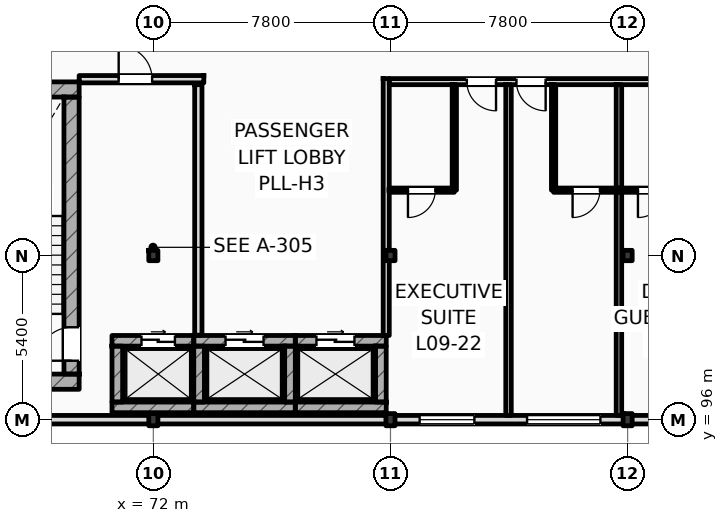
"""IFC4 building model, lengths in metres.
Left out: names, types, materials, properties, quantities, classifications, styles, units other than length and angle.
Written with IfcOpenShell. Run it as: python <this file> out.ifc"""

import sys

from ifc_helpers import new_model, si_unit, direction, frame, frame_2d, origin, origin_2d, place, context, subcontext, project, spatial, rectangle, i_section, extrude, element, fill, save


model = new_model("IFC4")
c1 = context("Model", 3, precision=1e-05, world=origin(), true_north=direction((0.0, 1.0)))
c2 = subcontext(c1, "Body", "Model", "MODEL_VIEW")
j1 = project(units=[si_unit("LENGTHUNIT", "METRE"), si_unit("PLANEANGLEUNIT", "RADIAN")], contexts=[c1])
p1 = place(None, origin())
s1 = spatial("IfcSite", under=j1, at=p1, CompositionType="ELEMENT")
p2 = place(p1, origin())
s2 = spatial("IfcBuilding", under=s1, at=p2, CompositionType="ELEMENT")
p3 = place(p2, frame((0.0, 0.0, 39.0)))
s3 = spatial("IfcBuildingStorey", under=s2, at=p3, CompositionType="ELEMENT", Elevation=39.0)
p4 = place(p3, frame((72.0, 96.0, 0.0), z_axis=(0.0, 0.0, 1.0), x_axis=(1.0, 0.0, 0.0)))
e1 = element("IfcColumn", 1, at=p4, inside=s3, PredefinedType="COLUMN", context=c2, shape_type="SweptSolid", body=[
    extrude(i_section(OverallWidth=0.3, OverallDepth=0.4, WebThickness=0.013, FlangeThickness=0.024, FilletRadius=0.027, at=origin_2d()), origin(), (0.0, 0.0, 1.0), 3.6),
])
p5 = place(p3, frame((72.0, 101.4, 0.0), z_axis=(0.0, 0.0, 1.0), x_axis=(1.0, 0.0, 0.0)))
e2 = element("IfcColumn", 2, at=p5, inside=s3, PredefinedType="COLUMN", context=c2, shape_type="SweptSolid", body=[
    extrude(i_section(OverallWidth=0.3, OverallDepth=0.34, WebThickness=0.012, FlangeThickness=0.021, FilletRadius=0.027, at=origin_2d()), origin(), (0.0, 0.0, 1.0), 3.6),
])
p6 = place(p3, frame((79.8, 96.0, 0.0), z_axis=(0.0, 0.0, 1.0), x_axis=(1.0, 0.0, 0.0)))
e3 = element("IfcColumn", 3, at=p6, inside=s3, PredefinedType="COLUMN", context=c2, shape_type="SweptSolid", body=[
    extrude(i_section(OverallWidth=0.3, OverallDepth=0.4, WebThickness=0.013, FlangeThickness=0.024, FilletRadius=0.027, at=origin_2d()), origin(), (0.0, 0.0, 1.0), 3.6),
])
p7 = place(p3, frame((79.8, 101.4, 0.0), z_axis=(0.0, 0.0, 1.0), x_axis=(1.0, 0.0, 0.0)))
e4 = element("IfcColumn", 4, at=p7, inside=s3, PredefinedType="COLUMN", context=c2, shape_type="SweptSolid", body=[
    extrude(i_section(OverallWidth=0.3, OverallDepth=0.34, WebThickness=0.012, FlangeThickness=0.021, FilletRadius=0.027, at=origin_2d()), origin(), (0.0, 0.0, 1.0), 3.6),
])
p8 = place(p3, frame((87.6, 96.0, 0.0), z_axis=(0.0, 0.0, 1.0), x_axis=(1.0, 0.0, 0.0)))
e5 = element("IfcColumn", 5, at=p8, inside=s3, PredefinedType="COLUMN", context=c2, shape_type="SweptSolid", body=[
    extrude(i_section(OverallWidth=0.3, OverallDepth=0.4, WebThickness=0.013, FlangeThickness=0.024, FilletRadius=0.027, at=origin_2d()), origin(), (0.0, 0.0, 1.0), 3.6),
])
p9 = place(p3, frame((87.6, 101.4, 0.0), z_axis=(0.0, 0.0, 1.0), x_axis=(1.0, 0.0, 0.0)))
e6 = element("IfcColumn", 6, at=p9, inside=s3, PredefinedType="COLUMN", context=c2, shape_type="SweptSolid", body=[
    extrude(i_section(OverallWidth=0.3, OverallDepth=0.34, WebThickness=0.012, FlangeThickness=0.021, FilletRadius=0.027, at=origin_2d()), origin(), (0.0, 0.0, 1.0), 3.6),
])
for number, where, z_axis, x_axis in (
    (7, (64.4, 106.862, 0.0), (0.0, 0.0, 1.0), (1.0, 0.0, 0.0)),
    (8, (64.4, 97.25, 0.0), (0.0, 0.0, 1.0), (1.0, 0.0, 0.0)),
):
    element("IfcWall", number, at=place(p3, frame(where, z_axis=z_axis, x_axis=x_axis)), inside=s3, PredefinedType="SHEAR", context=c2, shape_type="SweptSolid", body=[
        extrude(rectangle(XDim=5.16, YDim=0.5, at=frame_2d((2.58, 0.0))), origin(), (0.0, 0.0, 1.0), 3.6),
    ])
p10 = place(p3, frame((69.31, 97.5, 0.0), z_axis=(0.0, 0.0, 1.0), x_axis=(0.0, 1.0, 0.0)))
e9 = element("IfcWall", 9, at=p10, inside=s3, PredefinedType="SHEAR", context=c2, shape_type="SweptSolid", body=[
    extrude(rectangle(XDim=9.112, YDim=0.5, at=frame_2d((4.556, 0.0))), origin(), (0.0, 0.0, 1.0), 3.6),
])
p11 = place(p10, frame((0.44, 0.0, 0.0)))
e10 = element("IfcOpeningElement", 10, at=p11, cuts=e9, PredefinedType="OPENING", context=c2, shape_type="SweptSolid", body=[
    extrude(rectangle(XDim=1.1, YDim=2.2, at=frame_2d((0.55, 1.1))), frame((0.0, 0.26, 0.0), z_axis=(0.0, -1.0, 0.0), x_axis=(1.0, 0.0, 0.0)), (0.0, 0.0, 1.0), 0.52),
])
p12 = place(p3, frame((25.2, 96.0, 0.0), z_axis=(0.0, 0.0, 1.0), x_axis=(1.0, 0.0, 0.0)))
e11 = element("IfcWall", 11, at=p12, inside=s3, PredefinedType="STANDARD", context=c2, shape_type="SweptSolid", body=[
    extrude(rectangle(XDim=70.2, YDim=0.28, at=frame_2d((35.1, 0.0))), origin(), (0.0, 0.0, 1.0), 2.92),
])
p13 = place(p12, frame((16.695, 0.0, 0.9)))
e12 = element("IfcOpeningElement", 12, at=p13, cuts=e11, PredefinedType="OPENING", context=c2, shape_type="SweptSolid", body=[
    extrude(rectangle(XDim=2.25, YDim=1.84, at=frame_2d((1.125, 0.92))), frame((0.0, 0.15, 0.0), z_axis=(0.0, -1.0, 0.0), x_axis=(1.0, 0.0, 0.0)), (0.0, 0.0, 1.0), 0.3),
])
p14 = place(p12, frame((20.748, 0.0, 0.9)))
e13 = element("IfcOpeningElement", 13, at=p14, cuts=e11, PredefinedType="OPENING", context=c2, shape_type="SweptSolid", body=[
    extrude(rectangle(XDim=1.8, YDim=1.84, at=frame_2d((0.9, 0.92))), frame((0.0, 0.15, 0.0), z_axis=(0.0, -1.0, 0.0), x_axis=(1.0, 0.0, 0.0)), (0.0, 0.0, 1.0), 0.3),
])
p15 = place(p12, frame((25.963, 0.0, 0.9)))
e14 = element("IfcOpeningElement", 14, at=p15, cuts=e11, PredefinedType="OPENING", context=c2, shape_type="SweptSolid", body=[
    extrude(rectangle(XDim=2.55, YDim=1.84, at=frame_2d((1.275, 0.92))), frame((0.0, 0.15, 0.0), z_axis=(0.0, -1.0, 0.0), x_axis=(1.0, 0.0, 0.0)), (0.0, 0.0, 1.0), 0.3),
])
p16 = place(p12, frame((32.177, 0.0, 0.9)))
e15 = element("IfcOpeningElement", 15, at=p16, cuts=e11, PredefinedType="OPENING", context=c2, shape_type="SweptSolid", body=[
    extrude(rectangle(XDim=1.35, YDim=1.84, at=frame_2d((0.675, 0.92))), frame((0.0, 0.15, 0.0), z_axis=(0.0, -1.0, 0.0), x_axis=(1.0, 0.0, 0.0)), (0.0, 0.0, 1.0), 0.3),
])
p17 = place(p12, frame((35.267, 0.0, 0.9)))
e16 = element("IfcOpeningElement", 16, at=p17, cuts=e11, PredefinedType="OPENING", context=c2, shape_type="SweptSolid", body=[
    extrude(rectangle(XDim=2.85, YDim=1.84, at=frame_2d((1.425, 0.92))), frame((0.0, 0.15, 0.0), z_axis=(0.0, -1.0, 0.0), x_axis=(1.0, 0.0, 0.0)), (0.0, 0.0, 1.0), 0.3),
])
p18 = place(p12, frame((55.56, 0.0, 0.9)))
e17 = element("IfcOpeningElement", 17, at=p18, cuts=e11, PredefinedType="OPENING", context=c2, shape_type="SweptSolid", body=[
    extrude(rectangle(XDim=1.8, YDim=1.84, at=frame_2d((0.9, 0.92))), frame((0.0, 0.15, 0.0), z_axis=(0.0, -1.0, 0.0), x_axis=(1.0, 0.0, 0.0)), (0.0, 0.0, 1.0), 0.3),
])
p19 = place(p12, frame((59.093, 0.0, 0.9)))
e18 = element("IfcOpeningElement", 18, at=p19, cuts=e11, PredefinedType="OPENING", context=c2, shape_type="SweptSolid", body=[
    extrude(rectangle(XDim=2.412, YDim=1.84, at=frame_2d((1.206, 0.92))), frame((0.0, 0.15, 0.0), z_axis=(0.0, -1.0, 0.0), x_axis=(1.0, 0.0, 0.0)), (0.0, 0.0, 1.0), 0.3),
])
p20 = place(p12, frame((63.325, 0.0, 0.9)))
e19 = element("IfcOpeningElement", 19, at=p20, cuts=e11, PredefinedType="OPENING", context=c2, shape_type="SweptSolid", body=[
    extrude(rectangle(XDim=1.8, YDim=1.84, at=frame_2d((0.9, 0.92))), frame((0.0, 0.15, 0.0), z_axis=(0.0, -1.0, 0.0), x_axis=(1.0, 0.0, 0.0)), (0.0, 0.0, 1.0), 0.3),
])
p21 = place(p12, frame((66.718, 0.0, 0.9)))
e20 = element("IfcOpeningElement", 20, at=p21, cuts=e11, PredefinedType="OPENING", context=c2, shape_type="SweptSolid", body=[
    extrude(rectangle(XDim=2.472, YDim=1.84, at=frame_2d((1.236, 0.92))), frame((0.0, 0.15, 0.0), z_axis=(0.0, -1.0, 0.0), x_axis=(1.0, 0.0, 0.0)), (0.0, 0.0, 1.0), 0.3),
])
p22 = place(p3, frame((70.64, 98.595, 0.0), z_axis=(0.0, 0.0, 1.0), x_axis=(1.0, 0.0, 0.0)))
e21 = element("IfcWall", 21, at=p22, inside=s3, PredefinedType="SHEAR", context=c2, shape_type="SweptSolid", body=[
    extrude(rectangle(XDim=2.69, YDim=0.35, at=frame_2d((1.345, 0.0))), origin(), (0.0, 0.0, 1.0), 3.38),
])
p23 = place(p22, frame((0.97, 0.0, 0.0)))
e22 = element("IfcOpeningElement", 22, at=p23, cuts=e21, PredefinedType="OPENING", context=c2, shape_type="SweptSolid", body=[
    extrude(rectangle(XDim=1.1, YDim=2.2, at=frame_2d((0.55, 1.1))), frame((0.0, 0.185, 0.0), z_axis=(0.0, -1.0, 0.0), x_axis=(1.0, 0.0, 0.0)), (0.0, 0.0, 1.0), 0.37),
])
p24 = place(p3, frame((70.64, 96.405, 0.0), z_axis=(0.0, 0.0, 1.0), x_axis=(1.0, 0.0, 0.0)))
e23 = element("IfcWall", 23, at=p24, inside=s3, PredefinedType="SHEAR", context=c2, shape_type="SweptSolid", body=[
    extrude(rectangle(XDim=2.69, YDim=0.35, at=frame_2d((1.345, 0.0))), origin(), (0.0, 0.0, 1.0), 3.38),
])
p25 = place(p3, frame((70.815, 96.58, 0.0), z_axis=(0.0, 0.0, 1.0), x_axis=(0.0, 1.0, 0.0)))
e24 = element("IfcWall", 24, at=p25, inside=s3, PredefinedType="SHEAR", context=c2, shape_type="SweptSolid", body=[
    extrude(rectangle(XDim=1.84, YDim=0.35, at=frame_2d((0.92, 0.0))), origin(), (0.0, 0.0, 1.0), 3.38),
])
p26 = place(p3, frame((73.33, 98.595, 0.0), z_axis=(0.0, 0.0, 1.0), x_axis=(1.0, 0.0, 0.0)))
e25 = element("IfcWall", 25, at=p26, inside=s3, PredefinedType="SHEAR", context=c2, shape_type="SweptSolid", body=[
    extrude(rectangle(XDim=3.34, YDim=0.35, at=frame_2d((1.67, 0.0))), origin(), (0.0, 0.0, 1.0), 3.38),
])
p27 = place(p26, frame((1.045, 0.0, 0.0)))
e26 = element("IfcOpeningElement", 26, at=p27, cuts=e25, PredefinedType="OPENING", context=c2, shape_type="SweptSolid", body=[
    extrude(rectangle(XDim=1.25, YDim=2.25, at=frame_2d((0.625, 1.125))), frame((0.0, 0.185, 0.0), z_axis=(0.0, -1.0, 0.0), x_axis=(1.0, 0.0, 0.0)), (0.0, 0.0, 1.0), 0.37),
])
p28 = place(p3, frame((73.33, 96.405, 0.0), z_axis=(0.0, 0.0, 1.0), x_axis=(1.0, 0.0, 0.0)))
e27 = element("IfcWall", 27, at=p28, inside=s3, PredefinedType="SHEAR", context=c2, shape_type="SweptSolid", body=[
    extrude(rectangle(XDim=3.34, YDim=0.35, at=frame_2d((1.67, 0.0))), origin(), (0.0, 0.0, 1.0), 3.38),
])
for number, where, z_axis, x_axis in (
    (28, (73.505, 96.58, 0.0), (0.0, 0.0, 1.0), (0.0, 1.0, 0.0)),
    (29, (76.495, 96.58, 0.0), (0.0, 0.0, 1.0), (0.0, 1.0, 0.0)),
):
    element("IfcWall", number, at=place(p3, frame(where, z_axis=z_axis, x_axis=x_axis)), inside=s3, PredefinedType="SHEAR", context=c2, shape_type="SweptSolid", body=[
        extrude(rectangle(XDim=1.84, YDim=0.35, at=frame_2d((0.92, 0.0))), origin(), (0.0, 0.0, 1.0), 3.38),
    ])
p29 = place(p3, frame((76.67, 98.595, 0.0), z_axis=(0.0, 0.0, 1.0), x_axis=(1.0, 0.0, 0.0)))
e30 = element("IfcWall", 30, at=p29, inside=s3, PredefinedType="SHEAR", context=c2, shape_type="SweptSolid", body=[
    extrude(rectangle(XDim=2.99, YDim=0.35, at=frame_2d((1.495, 0.0))), origin(), (0.0, 0.0, 1.0), 3.38),
])
p30 = place(p29, frame((0.695, 0.0, 0.0)))
e31 = element("IfcOpeningElement", 31, at=p30, cuts=e30, PredefinedType="OPENING", context=c2, shape_type="SweptSolid", body=[
    extrude(rectangle(XDim=1.25, YDim=2.25, at=frame_2d((0.625, 1.125))), frame((0.0, 0.185, 0.0), z_axis=(0.0, -1.0, 0.0), x_axis=(1.0, 0.0, 0.0)), (0.0, 0.0, 1.0), 0.37),
])
p31 = place(p3, frame((76.67, 96.405, 0.0), z_axis=(0.0, 0.0, 1.0), x_axis=(1.0, 0.0, 0.0)))
e32 = element("IfcWall", 32, at=p31, inside=s3, PredefinedType="SHEAR", context=c2, shape_type="SweptSolid", body=[
    extrude(rectangle(XDim=2.99, YDim=0.35, at=frame_2d((1.495, 0.0))), origin(), (0.0, 0.0, 1.0), 3.38),
])
p32 = place(p3, frame((79.485, 96.58, 0.0), z_axis=(0.0, 0.0, 1.0), x_axis=(0.0, 1.0, 0.0)))
e33 = element("IfcWall", 33, at=p32, inside=s3, PredefinedType="SHEAR", context=c2, shape_type="SweptSolid", body=[
    extrude(rectangle(XDim=1.84, YDim=0.35, at=frame_2d((0.92, 0.0))), origin(), (0.0, 0.0, 1.0), 3.01),
])
p33 = place(p3, frame((73.48, 98.78, 0.0), z_axis=(0.0, 0.0, 1.0), x_axis=(0.0, 1.0, 0.0)))
e34 = element("IfcWall", 34, at=p33, inside=s3, PredefinedType="STANDARD", context=c2, shape_type="SweptSolid", body=[
    extrude(rectangle(XDim=8.24, YDim=0.24, at=frame_2d((4.12, 0.0))), origin(), (0.0, 0.0, 1.0), 3.38),
])
p34 = place(p3, frame((69.56, 107.2, 0.0), z_axis=(0.0, 0.0, 1.0), x_axis=(1.0, 0.0, 0.0)))
e35 = element("IfcWall", 35, at=p34, inside=s3, PredefinedType="STANDARD", context=c2, shape_type="SweptSolid", body=[
    extrude(rectangle(XDim=4.1, YDim=0.24, at=frame_2d((2.05, 0.0))), origin(), (0.0, 0.0, 1.0), 3.38),
])
p35 = place(p34, frame((1.3, 0.0, 0.0)))
e36 = element("IfcOpeningElement", 36, at=p35, cuts=e35, PredefinedType="OPENING", context=c2, shape_type="SweptSolid", body=[
    extrude(rectangle(XDim=1.1, YDim=2.2, at=frame_2d((0.55, 1.1))), frame((0.0, 0.13, 0.0), z_axis=(0.0, -1.0, 0.0), x_axis=(1.0, 0.0, 0.0)), (0.0, 0.0, 1.0), 0.26),
])
p36 = place(p3, frame((79.76, 107.12, 0.0), z_axis=(0.0, 0.0, 1.0), x_axis=(1.0, 0.0, 0.0)))
e37 = element("IfcWall", 37, at=p36, inside=s3, PredefinedType="PARTITIONING", context=c2, shape_type="SweptSolid", body=[
    extrude(rectangle(XDim=15.5, YDim=0.2, at=frame_2d((7.75, 0.0))), origin(), (0.0, 0.0, 1.0), 3.38),
])
p37 = place(p36, frame((2.552, 0.0, 0.0)))
e38 = element("IfcOpeningElement", 38, at=p37, cuts=e37, PredefinedType="OPENING", context=c2, shape_type="SweptSolid", body=[
    extrude(rectangle(XDim=0.96, YDim=2.2, at=frame_2d((0.48, 1.1))), frame((0.0, 0.11, 0.0), z_axis=(0.0, -1.0, 0.0), x_axis=(1.0, 0.0, 0.0)), (0.0, 0.0, 1.0), 0.22),
])
p38 = place(p36, frame((4.184, 0.0, 0.0)))
e39 = element("IfcOpeningElement", 39, at=p38, cuts=e37, PredefinedType="OPENING", context=c2, shape_type="SweptSolid", body=[
    extrude(rectangle(XDim=0.96, YDim=2.2, at=frame_2d((0.48, 1.1))), frame((0.0, 0.11, 0.0), z_axis=(0.0, -1.0, 0.0), x_axis=(1.0, 0.0, 0.0)), (0.0, 0.0, 1.0), 0.22),
])
p39 = place(p36, frame((10.146, 0.0, 0.0)))
e40 = element("IfcOpeningElement", 40, at=p39, cuts=e37, PredefinedType="OPENING", context=c2, shape_type="SweptSolid", body=[
    extrude(rectangle(XDim=0.96, YDim=2.2, at=frame_2d((0.48, 1.1))), frame((0.0, 0.11, 0.0), z_axis=(0.0, -1.0, 0.0), x_axis=(1.0, 0.0, 0.0)), (0.0, 0.0, 1.0), 0.22),
])
p40 = place(p36, frame((11.839, 0.0, 0.0)))
e41 = element("IfcOpeningElement", 41, at=p40, cuts=e37, PredefinedType="OPENING", context=c2, shape_type="SweptSolid", body=[
    extrude(rectangle(XDim=0.96, YDim=2.2, at=frame_2d((0.48, 1.1))), frame((0.0, 0.11, 0.0), z_axis=(0.0, -1.0, 0.0), x_axis=(1.0, 0.0, 0.0)), (0.0, 0.0, 1.0), 0.22),
])
p41 = place(p3, frame((79.66, 98.77, 0.0), z_axis=(0.0, 0.0, 1.0), x_axis=(0.0, 1.0, 0.0)))
e42 = element("IfcWall", 42, at=p41, inside=s3, PredefinedType="PARTITIONING", context=c2, shape_type="SweptSolid", body=[
    extrude(rectangle(XDim=8.45, YDim=0.2, at=frame_2d((4.225, 0.0))), origin(), (0.0, 0.0, 1.0), 3.01),
])
p42 = place(p3, frame((83.683, 96.14, 0.0), z_axis=(0.0, 0.0, 1.0), x_axis=(0.0, 1.0, 0.0)))
e43 = element("IfcWall", 43, at=p42, inside=s3, PredefinedType="PARTITIONING", context=c2, shape_type="SweptSolid", body=[
    extrude(rectangle(XDim=10.88, YDim=0.18, at=frame_2d((5.44, 0.0))), origin(), (0.0, 0.0, 1.0), 3.38),
])
p43 = place(p3, frame((81.9, 103.55, 0.0), z_axis=(0.0, 0.0, 1.0), x_axis=(0.0, 1.0, 0.0)))
e44 = element("IfcWall", 44, at=p43, inside=s3, PredefinedType="PARTITIONING", context=c2, shape_type="SweptSolid", body=[
    extrude(rectangle(XDim=3.47, YDim=0.14, at=frame_2d((1.735, 0.0))), origin(), (0.0, 0.0, 1.0), 3.38),
])
p44 = place(p3, frame((79.75, 103.55, 0.0), z_axis=(0.0, 0.0, 1.0), x_axis=(1.0, 0.0, 0.0)))
e45 = element("IfcWall", 45, at=p44, inside=s3, PredefinedType="PARTITIONING", context=c2, shape_type="SweptSolid", body=[
    extrude(rectangle(XDim=2.15, YDim=0.14, at=frame_2d((1.075, 0.0))), origin(), (0.0, 0.0, 1.0), 3.38),
])
p45 = place(p44, frame((0.625, 0.0, 0.0)))
e46 = element("IfcOpeningElement", 46, at=p45, cuts=e45, PredefinedType="OPENING", context=c2, shape_type="SweptSolid", body=[
    extrude(rectangle(XDim=0.9, YDim=2.1, at=frame_2d((0.45, 1.05))), frame((0.0, 0.08, 0.0), z_axis=(0.0, -1.0, 0.0), x_axis=(1.0, 0.0, 0.0)), (0.0, 0.0, 1.0), 0.16),
])
p46 = place(p3, frame((87.315, 96.14, 0.0), z_axis=(0.0, 0.0, 1.0), x_axis=(0.0, 1.0, 0.0)))
e47 = element("IfcWall", 47, at=p46, inside=s3, PredefinedType="PARTITIONING", context=c2, shape_type="SweptSolid", body=[
    extrude(rectangle(XDim=10.88, YDim=0.18, at=frame_2d((5.44, 0.0))), origin(), (0.0, 0.0, 1.0), 3.38),
])
p47 = place(p3, frame((85.165, 103.55, 0.0), z_axis=(0.0, 0.0, 1.0), x_axis=(0.0, 1.0, 0.0)))
e48 = element("IfcWall", 48, at=p47, inside=s3, PredefinedType="PARTITIONING", context=c2, shape_type="SweptSolid", body=[
    extrude(rectangle(XDim=3.47, YDim=0.14, at=frame_2d((1.735, 0.0))), origin(), (0.0, 0.0, 1.0), 3.07),
])
p48 = place(p3, frame((85.165, 103.55, 0.0), z_axis=(0.0, 0.0, 1.0), x_axis=(1.0, 0.0, 0.0)))
e49 = element("IfcWall", 49, at=p48, inside=s3, PredefinedType="PARTITIONING", context=c2, shape_type="SweptSolid", body=[
    extrude(rectangle(XDim=2.15, YDim=0.14, at=frame_2d((1.075, 0.0))), origin(), (0.0, 0.0, 1.0), 3.38),
])
p49 = place(p48, frame((0.625, 0.0, 0.0)))
e50 = element("IfcOpeningElement", 50, at=p49, cuts=e49, PredefinedType="OPENING", context=c2, shape_type="SweptSolid", body=[
    extrude(rectangle(XDim=0.9, YDim=2.1, at=frame_2d((0.45, 1.05))), frame((0.0, 0.08, 0.0), z_axis=(0.0, -1.0, 0.0), x_axis=(1.0, 0.0, 0.0)), (0.0, 0.0, 1.0), 0.16),
])
p50 = place(p3, frame((87.315, 103.55, 0.0), z_axis=(0.0, 0.0, 1.0), x_axis=(1.0, 0.0, 0.0)))
e51 = element("IfcWall", 51, at=p50, inside=s3, PredefinedType="PARTITIONING", context=c2, shape_type="SweptSolid", body=[
    extrude(rectangle(XDim=2.15, YDim=0.14, at=frame_2d((1.075, 0.0))), origin(), (0.0, 0.0, 1.0), 3.38),
])
p51 = place(p50, frame((0.625, 0.0, 0.0)))
e52 = element("IfcOpeningElement", 52, at=p51, cuts=e51, PredefinedType="OPENING", context=c2, shape_type="SweptSolid", body=[
    extrude(rectangle(XDim=0.9, YDim=2.1, at=frame_2d((0.45, 1.05))), frame((0.0, 0.08, 0.0), z_axis=(0.0, -1.0, 0.0), x_axis=(1.0, 0.0, 0.0)), (0.0, 0.0, 1.0), 0.16),
])
p52 = place(p18, origin())
e53 = element("IfcWindow", 53, at=p52, inside=s3, PartitioningType="DOUBLE_PANEL_VERTICAL", PredefinedType="WINDOW", context=c2, shape_type="SweptSolid", body=[
    extrude(rectangle(XDim=1.8, YDim=1.84, at=frame_2d((0.9, 0.92))), frame((0.0, 0.03, 0.0), z_axis=(0.0, -1.0, 0.0), x_axis=(1.0, 0.0, 0.0)), (0.0, 0.0, 1.0), 0.06),
])
fill(e17, e53)
p53 = place(p19, origin())
e54 = element("IfcWindow", 54, at=p53, inside=s3, PartitioningType="DOUBLE_PANEL_VERTICAL", PredefinedType="WINDOW", context=c2, shape_type="SweptSolid", body=[
    extrude(rectangle(XDim=2.412, YDim=1.84, at=frame_2d((1.206, 0.92))), frame((0.0, 0.03, 0.0), z_axis=(0.0, -1.0, 0.0), x_axis=(1.0, 0.0, 0.0)), (0.0, 0.0, 1.0), 0.06),
])
fill(e18, e54)
p54 = place(p11, origin())
e55 = element("IfcDoor", 55, at=p54, inside=s3, OperationType="SINGLE_SWING_LEFT", PredefinedType="DOOR", context=c2, shape_type="SweptSolid", body=[
    extrude(rectangle(XDim=1.1, YDim=2.2, at=frame_2d((0.55, 1.1))), frame((0.0, 0.025, 0.0), z_axis=(0.0, -1.0, 0.0), x_axis=(1.0, 0.0, 0.0)), (0.0, 0.0, 1.0), 0.05),
])
fill(e10, e55)
p55 = place(p23, origin())
e56 = element("IfcDoor", 56, at=p55, inside=s3, OperationType="SLIDING_TO_LEFT", PredefinedType="DOOR", context=c2, shape_type="SweptSolid", body=[
    extrude(rectangle(XDim=1.1, YDim=2.2, at=frame_2d((0.55, 1.1))), frame((0.0, 0.025, 0.0), z_axis=(0.0, -1.0, 0.0), x_axis=(1.0, 0.0, 0.0)), (0.0, 0.0, 1.0), 0.05),
])
fill(e22, e56)
p56 = place(p27, origin())
e57 = element("IfcDoor", 57, at=p56, inside=s3, OperationType="SLIDING_TO_LEFT", PredefinedType="DOOR", context=c2, shape_type="SweptSolid", body=[
    extrude(rectangle(XDim=1.25, YDim=2.25, at=frame_2d((0.625, 1.125))), frame((0.0, 0.025, 0.0), z_axis=(0.0, -1.0, 0.0), x_axis=(1.0, 0.0, 0.0)), (0.0, 0.0, 1.0), 0.05),
])
fill(e26, e57)
p57 = place(p30, origin())
e58 = element("IfcDoor", 58, at=p57, inside=s3, OperationType="SLIDING_TO_LEFT", PredefinedType="DOOR", context=c2, shape_type="SweptSolid", body=[
    extrude(rectangle(XDim=1.25, YDim=2.25, at=frame_2d((0.625, 1.125))), frame((0.0, 0.025, 0.0), z_axis=(0.0, -1.0, 0.0), x_axis=(1.0, 0.0, 0.0)), (0.0, 0.0, 1.0), 0.05),
])
fill(e31, e58)
p58 = place(p35, origin())
e59 = element("IfcDoor", 59, at=p58, inside=s3, OperationType="SINGLE_SWING_LEFT", PredefinedType="DOOR", context=c2, shape_type="SweptSolid", body=[
    extrude(rectangle(XDim=1.1, YDim=2.2, at=frame_2d((0.55, 1.1))), frame((0.0, 0.025, 0.0), z_axis=(0.0, -1.0, 0.0), x_axis=(1.0, 0.0, 0.0)), (0.0, 0.0, 1.0), 0.05),
])
fill(e36, e59)
p59 = place(p37, frame((0.96, 0.0, 0.0), z_axis=(0.0, 0.0, 1.0), x_axis=(-1.0, 0.0, 0.0)))
e60 = element("IfcDoor", 60, at=p59, inside=s3, OperationType="SINGLE_SWING_RIGHT", PredefinedType="DOOR", context=c2, shape_type="SweptSolid", body=[
    extrude(rectangle(XDim=0.96, YDim=2.2, at=frame_2d((0.48, 1.1))), frame((0.0, 0.025, 0.0), z_axis=(0.0, -1.0, 0.0), x_axis=(1.0, 0.0, 0.0)), (0.0, 0.0, 1.0), 0.05),
])
fill(e38, e60)
p60 = place(p45, frame((0.9, 0.0, 0.0), z_axis=(0.0, 0.0, 1.0), x_axis=(-1.0, 0.0, 0.0)))
e61 = element("IfcDoor", 61, at=p60, inside=s3, OperationType="SINGLE_SWING_LEFT", PredefinedType="DOOR", context=c2, shape_type="SweptSolid", body=[
    extrude(rectangle(XDim=0.9, YDim=2.1, at=frame_2d((0.45, 1.05))), frame((0.0, 0.025, 0.0), z_axis=(0.0, -1.0, 0.0), x_axis=(1.0, 0.0, 0.0)), (0.0, 0.0, 1.0), 0.05),
])
fill(e46, e61)
p61 = place(p38, frame((0.96, 0.0, 0.0), z_axis=(0.0, 0.0, 1.0), x_axis=(-1.0, 0.0, 0.0)))
e62 = element("IfcDoor", 62, at=p61, inside=s3, OperationType="SINGLE_SWING_RIGHT", PredefinedType="DOOR", context=c2, shape_type="SweptSolid", body=[
    extrude(rectangle(XDim=0.96, YDim=2.2, at=frame_2d((0.48, 1.1))), frame((0.0, 0.025, 0.0), z_axis=(0.0, -1.0, 0.0), x_axis=(1.0, 0.0, 0.0)), (0.0, 0.0, 1.0), 0.05),
])
fill(e39, e62)
p62 = place(p49, frame((0.9, 0.0, 0.0), z_axis=(0.0, 0.0, 1.0), x_axis=(-1.0, 0.0, 0.0)))
e63 = element("IfcDoor", 63, at=p62, inside=s3, OperationType="SINGLE_SWING_LEFT", PredefinedType="DOOR", context=c2, shape_type="SweptSolid", body=[
    extrude(rectangle(XDim=0.9, YDim=2.1, at=frame_2d((0.45, 1.05))), frame((0.0, 0.025, 0.0), z_axis=(0.0, -1.0, 0.0), x_axis=(1.0, 0.0, 0.0)), (0.0, 0.0, 1.0), 0.05),
])
fill(e50, e63)
p63 = place(p51, frame((0.9, 0.0, 0.0), z_axis=(0.0, 0.0, 1.0), x_axis=(-1.0, 0.0, 0.0)))
e64 = element("IfcDoor", 64, at=p63, inside=s3, OperationType="SINGLE_SWING_LEFT", PredefinedType="DOOR", context=c2, shape_type="SweptSolid", body=[
    extrude(rectangle(XDim=0.9, YDim=2.1, at=frame_2d((0.45, 1.05))), frame((0.0, 0.025, 0.0), z_axis=(0.0, -1.0, 0.0), x_axis=(1.0, 0.0, 0.0)), (0.0, 0.0, 1.0), 0.05),
])
fill(e52, e64)
save(model, sys.argv[1])
